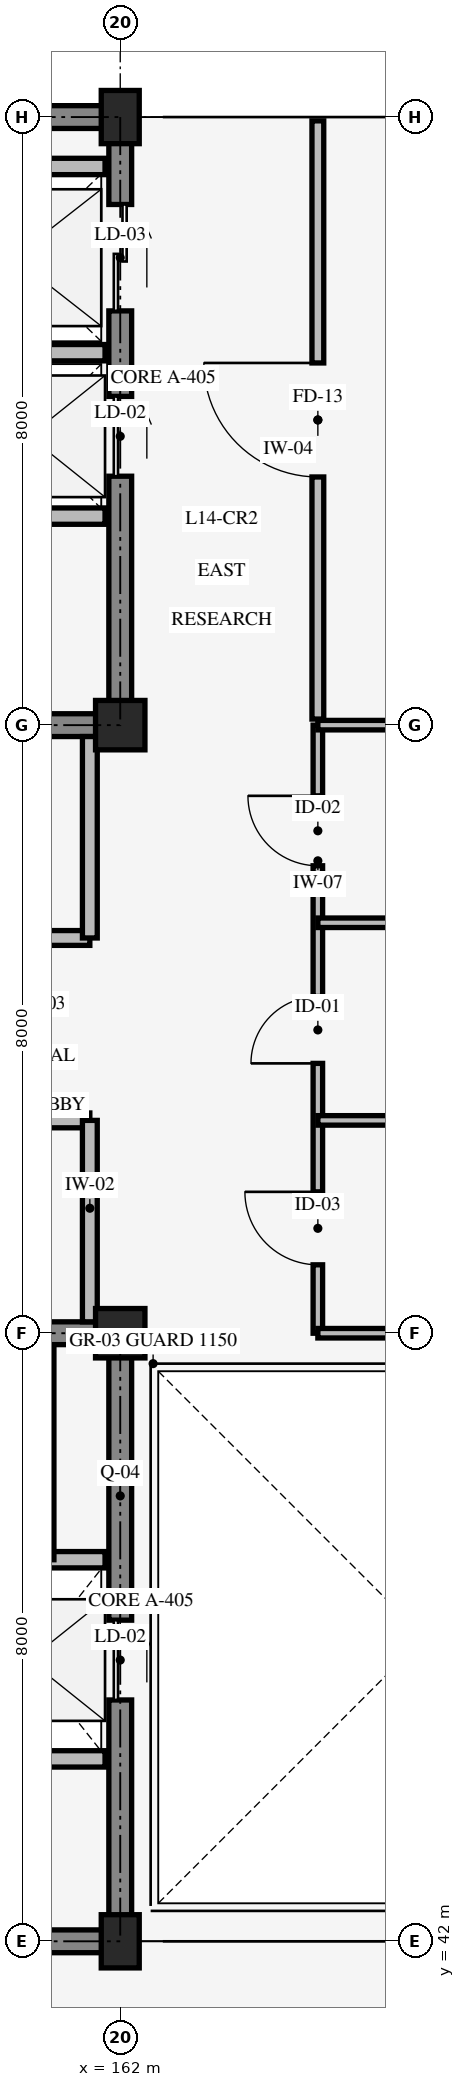
"""IFC4 building model, lengths in metres.
Left out: names, types, materials, properties, quantities, classifications, styles, units other than length and angle.
Written with IfcOpenShell. Run it as: python <this file> out.ifc"""

import sys

from ifc_helpers import new_model, si_unit, direction, frame, frame_2d, origin, origin_2d, place, context, subcontext, project, spatial, rectangle, extrude, element, fill, save


model = new_model("IFC4")
c1 = context("Model", 3, precision=1e-05, world=origin(), true_north=direction((0.0, 1.0)))
c2 = subcontext(c1, "Body", "Model", "MODEL_VIEW")
j1 = project(units=[si_unit("LENGTHUNIT", "METRE"), si_unit("PLANEANGLEUNIT", "RADIAN")], contexts=[c1])
p1 = place(None, origin())
s1 = spatial("IfcSite", under=j1, at=p1, CompositionType="ELEMENT")
p2 = place(p1, origin())
s2 = spatial("IfcBuilding", under=s1, at=p2, CompositionType="ELEMENT")
p3 = place(p2, frame((0.0, 0.0, 57.0)))
s3 = spatial("IfcBuildingStorey", under=s2, at=p3, CompositionType="ELEMENT", Elevation=57.0)
p4 = place(p3, frame((154.0, 42.0, 0.0), z_axis=(0.0, 0.0, 1.0), x_axis=(1.0, 0.0, 0.0)))
e1 = element("IfcWall", 1, at=p4, inside=s3, PredefinedType="SHEAR", context=c2, shape_type="SweptSolid", body=[
    extrude(rectangle(XDim=8.0, YDim=0.3, at=frame_2d((4.0, 0.0))), origin(), (0.0, 0.0, 1.0), 3.95),
])
p5 = place(p3, frame((162.0, 42.0, 0.0), z_axis=(0.0, 0.0, 1.0), x_axis=(0.0, 1.0, 0.0)))
e2 = element("IfcWall", 2, at=p5, inside=s3, PredefinedType="SHEAR", context=c2, shape_type="SweptSolid", body=[
    extrude(rectangle(XDim=8.0, YDim=0.3, at=frame_2d((4.0, 0.0))), origin(), (0.0, 0.0, 1.0), 3.95),
])
p6 = place(p5, frame((3.175, 0.0, 0.0)))
e3 = element("IfcOpeningElement", 3, at=p6, cuts=e2, PredefinedType="OPENING", context=c2, shape_type="SweptSolid", body=[
    extrude(rectangle(XDim=1.05, YDim=2.2, at=frame_2d((0.525, 1.1))), frame((0.0, 0.16, 0.0), z_axis=(0.0, -1.0, 0.0), x_axis=(1.0, 0.0, 0.0)), (0.0, 0.0, 1.0), 0.32),
])
p7 = place(p3, frame((162.0, 50.0, 0.0), z_axis=(0.0, 0.0, 1.0), x_axis=(-1.0, 0.0, 0.0)))
e4 = element("IfcWall", 4, at=p7, inside=s3, PredefinedType="SHEAR", context=c2, shape_type="SweptSolid", body=[
    extrude(rectangle(XDim=8.0, YDim=0.3, at=frame_2d((4.0, 0.0))), origin(), (0.0, 0.0, 1.0), 3.95),
])
p8 = place(p7, frame((5.3, 0.0, 0.0)))
e5 = element("IfcOpeningElement", 5, at=p8, cuts=e4, PredefinedType="OPENING", context=c2, shape_type="SweptSolid", body=[
    extrude(rectangle(XDim=1.3, YDim=2.15, at=frame_2d((0.65, 1.075))), frame((0.0, 0.16, 0.0), z_axis=(0.0, -1.0, 0.0), x_axis=(1.0, 0.0, 0.0)), (0.0, 0.0, 1.0), 0.32),
])
p9 = place(p7, frame((1.45, 0.0, 0.0)))
e6 = element("IfcOpeningElement", 6, at=p9, cuts=e4, PredefinedType="OPENING", context=c2, shape_type="SweptSolid", body=[
    extrude(rectangle(XDim=1.1, YDim=2.2, at=frame_2d((0.55, 1.1))), frame((0.0, 0.16, 0.0), z_axis=(0.0, -1.0, 0.0), x_axis=(1.0, 0.0, 0.0)), (0.0, 0.0, 1.0), 0.32),
])
p10 = place(p3, frame((154.0, 58.0, 0.0), z_axis=(0.0, 0.0, 1.0), x_axis=(1.0, 0.0, 0.0)))
e7 = element("IfcWall", 7, at=p10, inside=s3, PredefinedType="SHEAR", context=c2, shape_type="SweptSolid", body=[
    extrude(rectangle(XDim=8.0, YDim=0.3, at=frame_2d((4.0, 0.0))), origin(), (0.0, 0.0, 1.0), 3.95),
])
p11 = place(p10, frame((1.4, 0.0, 0.0)))
e8 = element("IfcOpeningElement", 8, at=p11, cuts=e7, PredefinedType="OPENING", context=c2, shape_type="SweptSolid", body=[
    extrude(rectangle(XDim=1.3, YDim=2.15, at=frame_2d((0.65, 1.075))), frame((0.0, 0.16, 0.0), z_axis=(0.0, -1.0, 0.0), x_axis=(1.0, 0.0, 0.0)), (0.0, 0.0, 1.0), 0.32),
])
p12 = place(p10, frame((5.3, 0.0, 0.0)))
e9 = element("IfcOpeningElement", 9, at=p12, cuts=e7, PredefinedType="OPENING", context=c2, shape_type="SweptSolid", body=[
    extrude(rectangle(XDim=1.1, YDim=2.2, at=frame_2d((0.55, 1.1))), frame((0.0, 0.16, 0.0), z_axis=(0.0, -1.0, 0.0), x_axis=(1.0, 0.0, 0.0)), (0.0, 0.0, 1.0), 0.32),
])
p13 = place(p3, frame((162.0, 58.0, 0.0), z_axis=(0.0, 0.0, 1.0), x_axis=(0.0, 1.0, 0.0)))
e10 = element("IfcWall", 10, at=p13, inside=s3, PredefinedType="SHEAR", context=c2, shape_type="SweptSolid", body=[
    extrude(rectangle(XDim=8.0, YDim=0.3, at=frame_2d((4.0, 0.0))), origin(), (0.0, 0.0, 1.0), 3.95),
])
p14 = place(p13, frame((3.275, 0.0, 0.0)))
e11 = element("IfcOpeningElement", 11, at=p14, cuts=e10, PredefinedType="OPENING", context=c2, shape_type="SweptSolid", body=[
    extrude(rectangle(XDim=1.05, YDim=2.2, at=frame_2d((0.525, 1.1))), frame((0.0, 0.16, 0.0), z_axis=(0.0, -1.0, 0.0), x_axis=(1.0, 0.0, 0.0)), (0.0, 0.0, 1.0), 0.32),
])
p15 = place(p13, frame((5.45, 0.0, 0.0)))
e12 = element("IfcOpeningElement", 12, at=p15, cuts=e10, PredefinedType="OPENING", context=c2, shape_type="SweptSolid", body=[
    extrude(rectangle(XDim=1.4, YDim=2.3, at=frame_2d((0.7, 1.15))), frame((0.0, 0.16, 0.0), z_axis=(0.0, -1.0, 0.0), x_axis=(1.0, 0.0, 0.0)), (0.0, 0.0, 1.0), 0.32),
])
p16 = place(p3, frame((162.0, 66.0, 0.0), z_axis=(0.0, 0.0, 1.0), x_axis=(-1.0, 0.0, 0.0)))
e13 = element("IfcWall", 13, at=p16, inside=s3, PredefinedType="SHEAR", context=c2, shape_type="SweptSolid", body=[
    extrude(rectangle(XDim=8.0, YDim=0.3, at=frame_2d((4.0, 0.0))), origin(), (0.0, 0.0, 1.0), 3.95),
])
p17 = place(p3, frame((162.0, 42.0, 0.0), z_axis=(0.0, 0.0, 1.0), x_axis=(1.0, 0.0, 0.0)))
e14 = element("IfcColumn", 14, at=p17, inside=s3, PredefinedType="COLUMN", context=c2, shape_type="SweptSolid", body=[
    extrude(rectangle(XDim=0.5, YDim=0.7, at=origin_2d()), origin(), (0.0, 0.0, 1.0), 4.2),
])
for number, where, z_axis, x_axis in (
    (15, (162.0, 50.0, 0.0), (0.0, 0.0, 1.0), (1.0, 0.0, 0.0)),
    (16, (162.0, 58.0, 0.0), (0.0, 0.0, 1.0), (1.0, 0.0, 0.0)),
):
    element("IfcColumn", number, at=place(p3, frame(where, z_axis=z_axis, x_axis=x_axis)), inside=s3, PredefinedType="COLUMN", context=c2, shape_type="SweptSolid", body=[
        extrude(rectangle(XDim=0.65, YDim=0.65, at=origin_2d()), origin(), (0.0, 0.0, 1.0), 4.2),
    ])
p18 = place(p3, frame((162.0, 66.0, 0.0), z_axis=(0.0, 0.0, 1.0), x_axis=(1.0, 0.0, 0.0)))
e17 = element("IfcColumn", 17, at=p18, inside=s3, PredefinedType="COLUMN", context=c2, shape_type="SweptSolid", body=[
    extrude(rectangle(XDim=0.5, YDim=0.7, at=origin_2d()), origin(), (0.0, 0.0, 1.0), 4.2),
])
p19 = place(p3, frame((158.45, 47.02, 0.0), z_axis=(0.0, 0.0, 1.0), x_axis=(1.0, 0.0, 0.0)))
e18 = element("IfcWall", 18, at=p19, inside=s3, PredefinedType="STANDARD", context=c2, shape_type="SweptSolid", body=[
    extrude(rectangle(XDim=3.35, YDim=0.215, at=frame_2d((1.675, 0.0))), origin(), (0.0, 0.0, 1.0), 3.9),
])
p20 = place(p3, frame((161.02, 47.02, 0.0), z_axis=(0.0, 0.0, 1.0), x_axis=(0.0, 1.0, 0.0)))
e19 = element("IfcWall", 19, at=p20, inside=s3, PredefinedType="STANDARD", context=c2, shape_type="SweptSolid", body=[
    extrude(rectangle(XDim=2.78, YDim=0.215, at=frame_2d((1.39, 0.0))), origin(), (0.0, 0.0, 1.0), 3.9),
])
p21 = place(p3, frame((159.78, 44.4, 0.0), z_axis=(0.0, 0.0, 1.0), x_axis=(1.0, 0.0, 0.0)))
e20 = element("IfcWall", 20, at=p21, inside=s3, PredefinedType="STANDARD", context=c2, shape_type="SweptSolid", body=[
    extrude(rectangle(XDim=2.02, YDim=0.215, at=frame_2d((1.01, 0.0))), origin(), (0.0, 0.0, 1.0), 3.9),
])
p22 = place(p3, frame((158.45, 62.9, 0.0), z_axis=(0.0, 0.0, 1.0), x_axis=(1.0, 0.0, 0.0)))
e21 = element("IfcWall", 21, at=p22, inside=s3, PredefinedType="STANDARD", context=c2, shape_type="SweptSolid", body=[
    extrude(rectangle(XDim=3.35, YDim=0.215, at=frame_2d((1.675, 0.0))), origin(), (0.0, 0.0, 1.0), 3.9),
])
p23 = place(p3, frame((159.38, 65.35, 0.0), z_axis=(0.0, 0.0, 1.0), x_axis=(1.0, 0.0, 0.0)))
e22 = element("IfcWall", 22, at=p23, inside=s3, PredefinedType="STANDARD", context=c2, shape_type="SweptSolid", body=[
    extrude(rectangle(XDim=2.42, YDim=0.215, at=frame_2d((1.21, 0.0))), origin(), (0.0, 0.0, 1.0), 3.9),
])
p24 = place(p3, frame((158.45, 60.75, 0.0), z_axis=(0.0, 0.0, 1.0), x_axis=(1.0, 0.0, 0.0)))
e23 = element("IfcWall", 23, at=p24, inside=s3, PredefinedType="STANDARD", context=c2, shape_type="SweptSolid", body=[
    extrude(rectangle(XDim=3.35, YDim=0.215, at=frame_2d((1.675, 0.0))), origin(), (0.0, 0.0, 1.0), 3.9),
])
p25 = place(p3, frame((154.0, 52.8, 0.0), z_axis=(0.0, 0.0, 1.0), x_axis=(1.0, 0.0, 0.0)))
e24 = element("IfcWall", 24, at=p25, inside=s3, PredefinedType="STANDARD", context=c2, shape_type="SweptSolid", body=[
    extrude(rectangle(XDim=7.6, YDim=0.195, at=frame_2d((3.8, 0.0))), origin(), (0.0, 0.0, 1.0), 3.9),
])
p26 = place(p25, frame((2.8, 0.0, 0.0)))
e25 = element("IfcOpeningElement", 25, at=p26, cuts=e24, PredefinedType="OPENING", context=c2, shape_type="SweptSolid", body=[
    extrude(rectangle(XDim=1.3, YDim=2.15, at=frame_2d((0.65, 1.075))), frame((0.0, 0.107, 0.0), z_axis=(0.0, -1.0, 0.0), x_axis=(1.0, 0.0, 0.0)), (0.0, 0.0, 1.0), 0.215),
])
p27 = place(p3, frame((161.6, 50.15, 0.0), z_axis=(0.0, 0.0, 1.0), x_axis=(0.0, 1.0, 0.0)))
e26 = element("IfcWall", 26, at=p27, inside=s3, PredefinedType="STANDARD", context=c2, shape_type="SweptSolid", body=[
    extrude(rectangle(XDim=2.65, YDim=0.195, at=frame_2d((1.325, 0.0))), origin(), (0.0, 0.0, 1.0), 3.34),
])
p28 = place(p3, frame((154.0, 55.2, 0.0), z_axis=(0.0, 0.0, 1.0), x_axis=(1.0, 0.0, 0.0)))
e27 = element("IfcWall", 27, at=p28, inside=s3, PredefinedType="STANDARD", context=c2, shape_type="SweptSolid", body=[
    extrude(rectangle(XDim=7.6, YDim=0.195, at=frame_2d((3.8, 0.0))), origin(), (0.0, 0.0, 1.0), 3.9),
])
p29 = place(p28, frame((2.8, 0.0, 0.0)))
e28 = element("IfcOpeningElement", 28, at=p29, cuts=e27, PredefinedType="OPENING", context=c2, shape_type="SweptSolid", body=[
    extrude(rectangle(XDim=1.4, YDim=2.2, at=frame_2d((0.7, 1.1))), frame((0.0, 0.107, 0.0), z_axis=(0.0, -1.0, 0.0), x_axis=(1.0, 0.0, 0.0)), (0.0, 0.0, 1.0), 0.215),
])
p30 = place(p3, frame((161.6, 55.2, 0.0), z_axis=(0.0, 0.0, 1.0), x_axis=(0.0, 1.0, 0.0)))
e29 = element("IfcWall", 29, at=p30, inside=s3, PredefinedType="STANDARD", context=c2, shape_type="SweptSolid", body=[
    extrude(rectangle(XDim=2.65, YDim=0.195, at=frame_2d((1.325, 0.0))), origin(), (0.0, 0.0, 1.0), 3.34),
])
p31 = place(p3, frame((164.6, 50.0, 0.0), z_axis=(0.0, 0.0, 1.0), x_axis=(0.0, 1.0, 0.0)))
e30 = element("IfcWall", 30, at=p31, inside=s3, PredefinedType="STANDARD", context=c2, shape_type="SweptSolid", body=[
    extrude(rectangle(XDim=8.0, YDim=0.125, at=frame_2d((4.0, 0.0))), origin(), (0.0, 0.0, 1.0), 3.9),
])
p32 = place(p31, frame((0.9, 0.0, 0.0)))
e31 = element("IfcOpeningElement", 31, at=p32, cuts=e30, PredefinedType="OPENING", context=c2, shape_type="SweptSolid", body=[
    extrude(rectangle(XDim=0.96, YDim=2.08, at=frame_2d((0.48, 1.04))), frame((0.0, 0.073, 0.0), z_axis=(0.0, -1.0, 0.0), x_axis=(1.0, 0.0, 0.0)), (0.0, 0.0, 1.0), 0.145),
])
p33 = place(p31, frame((3.55, 0.0, 0.0)))
e32 = element("IfcOpeningElement", 32, at=p33, cuts=e30, PredefinedType="OPENING", context=c2, shape_type="SweptSolid", body=[
    extrude(rectangle(XDim=0.88, YDim=2.05, at=frame_2d((0.44, 1.025))), frame((0.0, 0.073, 0.0), z_axis=(0.0, -1.0, 0.0), x_axis=(1.0, 0.0, 0.0)), (0.0, 0.0, 1.0), 0.145),
])
p34 = place(p31, frame((6.15, 0.0, 0.0)))
e33 = element("IfcOpeningElement", 33, at=p34, cuts=e30, PredefinedType="OPENING", context=c2, shape_type="SweptSolid", body=[
    extrude(rectangle(XDim=0.92, YDim=2.05, at=frame_2d((0.46, 1.025))), frame((0.0, 0.073, 0.0), z_axis=(0.0, -1.0, 0.0), x_axis=(1.0, 0.0, 0.0)), (0.0, 0.0, 1.0), 0.145),
])
p35 = place(p3, frame((164.6, 50.0, 0.0), z_axis=(0.0, 0.0, 1.0), x_axis=(1.0, 0.0, 0.0)))
e34 = element("IfcWall", 34, at=p35, inside=s3, PredefinedType="STANDARD", context=c2, shape_type="SweptSolid", body=[
    extrude(rectangle(XDim=3.8, YDim=0.125, at=frame_2d((1.9, 0.0))), origin(), (0.0, 0.0, 1.0), 3.29),
])
for number, where, z_axis, x_axis in (
    (35, (164.6, 52.8, 0.0), (0.0, 0.0, 1.0), (1.0, 0.0, 0.0)),
    (36, (164.6, 55.4, 0.0), (0.0, 0.0, 1.0), (1.0, 0.0, 0.0)),
):
    element("IfcWall", number, at=place(p3, frame(where, z_axis=z_axis, x_axis=x_axis)), inside=s3, PredefinedType="STANDARD", context=c2, shape_type="SweptSolid", body=[
        extrude(rectangle(XDim=3.8, YDim=0.125, at=frame_2d((1.9, 0.0))), origin(), (0.0, 0.0, 1.0), 3.9),
    ])
p36 = place(p3, frame((164.6, 58.0, 0.0), z_axis=(0.0, 0.0, 1.0), x_axis=(1.0, 0.0, 0.0)))
e37 = element("IfcWall", 37, at=p36, inside=s3, PredefinedType="STANDARD", context=c2, shape_type="SweptSolid", body=[
    extrude(rectangle(XDim=3.8, YDim=0.125, at=frame_2d((1.9, 0.0))), origin(), (0.0, 0.0, 1.0), 3.29),
])
p37 = place(p3, frame((164.6, 58.08, 0.0), z_axis=(0.0, 0.0, 1.0), x_axis=(0.0, 1.0, 0.0)))
e38 = element("IfcWall", 38, at=p37, inside=s3, PredefinedType="STANDARD", context=c2, shape_type="SweptSolid", body=[
    extrude(rectangle(XDim=7.87, YDim=0.155, at=frame_2d((3.935, 0.0))), origin(), (0.0, 0.0, 1.0), 3.9),
])
p38 = place(p37, frame((3.185, 0.0, 0.0)))
e39 = element("IfcOpeningElement", 39, at=p38, cuts=e38, PredefinedType="OPENING", context=c2, shape_type="SweptSolid", body=[
    extrude(rectangle(XDim=1.5, YDim=2.2, at=frame_2d((0.75, 1.1))), frame((0.0, 0.087, 0.0), z_axis=(0.0, -1.0, 0.0), x_axis=(1.0, 0.0, 0.0)), (0.0, 0.0, 1.0), 0.175),
])
p39 = place(p6, origin())
e40 = element("IfcDoor", 40, at=p39, inside=s3, OperationType="SLIDING_TO_LEFT", PredefinedType="DOOR", context=c2, shape_type="SweptSolid", body=[
    extrude(rectangle(XDim=1.05, YDim=2.2, at=frame_2d((0.525, 1.1))), frame((0.0, 0.025, 0.0), z_axis=(0.0, -1.0, 0.0), x_axis=(1.0, 0.0, 0.0)), (0.0, 0.0, 1.0), 0.05),
])
fill(e3, e40)
p40 = place(p14, origin())
e41 = element("IfcDoor", 41, at=p40, inside=s3, OperationType="SLIDING_TO_RIGHT", PredefinedType="DOOR", context=c2, shape_type="SweptSolid", body=[
    extrude(rectangle(XDim=1.05, YDim=2.2, at=frame_2d((0.525, 1.1))), frame((0.0, 0.025, 0.0), z_axis=(0.0, -1.0, 0.0), x_axis=(1.0, 0.0, 0.0)), (0.0, 0.0, 1.0), 0.05),
])
fill(e11, e41)
p41 = place(p15, origin())
e42 = element("IfcDoor", 42, at=p41, inside=s3, OperationType="DOUBLE_DOOR_SLIDING", PredefinedType="DOOR", context=c2, shape_type="SweptSolid", body=[
    extrude(rectangle(XDim=1.4, YDim=2.3, at=frame_2d((0.7, 1.15))), frame((0.0, 0.025, 0.0), z_axis=(0.0, -1.0, 0.0), x_axis=(1.0, 0.0, 0.0)), (0.0, 0.0, 1.0), 0.05),
])
fill(e12, e42)
p42 = place(p32, origin())
e43 = element("IfcDoor", 43, at=p42, inside=s3, OperationType="SINGLE_SWING_RIGHT", PredefinedType="DOOR", context=c2, shape_type="SweptSolid", body=[
    extrude(rectangle(XDim=0.96, YDim=2.08, at=frame_2d((0.48, 1.04))), frame((0.0, 0.025, 0.0), z_axis=(0.0, -1.0, 0.0), x_axis=(1.0, 0.0, 0.0)), (0.0, 0.0, 1.0), 0.05),
])
fill(e31, e43)
p43 = place(p33, origin())
e44 = element("IfcDoor", 44, at=p43, inside=s3, OperationType="SINGLE_SWING_LEFT", PredefinedType="DOOR", context=c2, shape_type="SweptSolid", body=[
    extrude(rectangle(XDim=0.88, YDim=2.05, at=frame_2d((0.44, 1.025))), frame((0.0, 0.025, 0.0), z_axis=(0.0, -1.0, 0.0), x_axis=(1.0, 0.0, 0.0)), (0.0, 0.0, 1.0), 0.05),
])
fill(e32, e44)
p44 = place(p34, origin())
e45 = element("IfcDoor", 45, at=p44, inside=s3, OperationType="SINGLE_SWING_RIGHT", PredefinedType="DOOR", context=c2, shape_type="SweptSolid", body=[
    extrude(rectangle(XDim=0.92, YDim=2.05, at=frame_2d((0.46, 1.025))), frame((0.0, 0.025, 0.0), z_axis=(0.0, -1.0, 0.0), x_axis=(1.0, 0.0, 0.0)), (0.0, 0.0, 1.0), 0.05),
])
fill(e33, e45)
p45 = place(p38, origin())
e46 = element("IfcDoor", 46, at=p45, inside=s3, OperationType="SINGLE_SWING_RIGHT", PredefinedType="DOOR", context=c2, shape_type="SweptSolid", body=[
    extrude(rectangle(XDim=1.5, YDim=2.2, at=frame_2d((0.75, 1.1))), frame((0.0, 0.025, 0.0), z_axis=(0.0, -1.0, 0.0), x_axis=(1.0, 0.0, 0.0)), (0.0, 0.0, 1.0), 0.05),
])
fill(e39, e46)
save(model, sys.argv[1])
